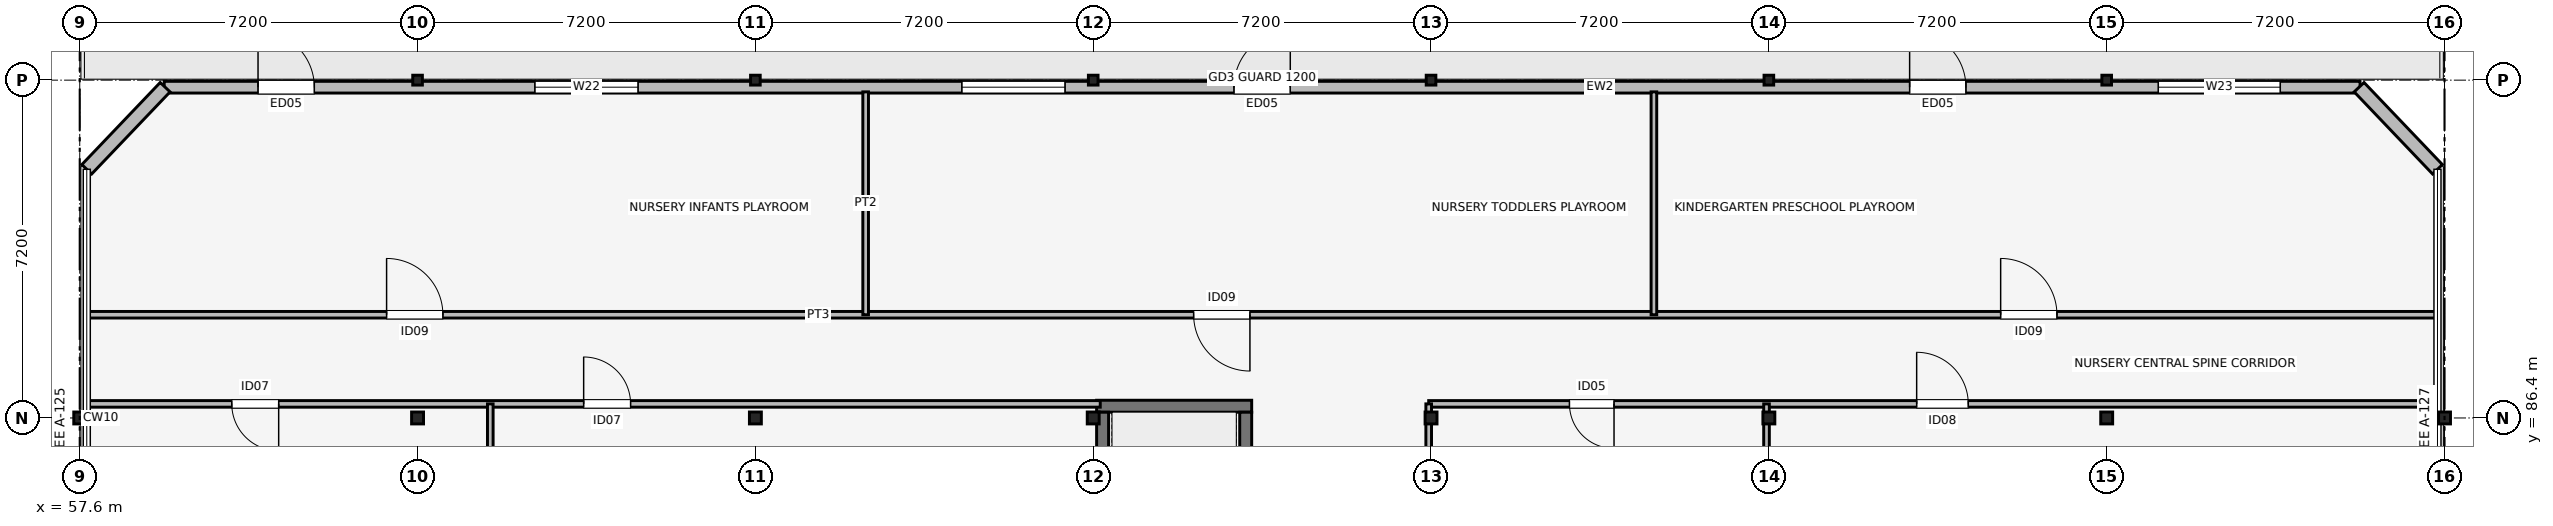
"""IFC4 building model, lengths in metres.
Left out: names, types, materials, properties, quantities, classifications, styles, units other than length and angle.
Written with IfcOpenShell. Run it as: python <this file> out.ifc"""

import sys

from ifc_helpers import new_model, si_unit, direction, frame, frame_2d, origin, origin_2d, place, context, subcontext, project, spatial, rectangle, i_section, extrude, element, fill, save


model = new_model("IFC4")
c1 = context("Model", 3, precision=1e-05, world=origin(), true_north=direction((0.0, 1.0)))
c2 = subcontext(c1, "Body", "Model", "MODEL_VIEW")
j1 = project(units=[si_unit("LENGTHUNIT", "METRE"), si_unit("PLANEANGLEUNIT", "RADIAN")], contexts=[c1])
p1 = place(None, origin())
s1 = spatial("IfcSite", under=j1, at=p1, CompositionType="ELEMENT")
p2 = place(p1, origin())
s2 = spatial("IfcBuilding", under=s1, at=p2, CompositionType="ELEMENT")
p3 = place(p2, frame((0.0, 0.0, 4.5)))
s3 = spatial("IfcBuildingStorey", under=s2, at=p3, CompositionType="ELEMENT", Elevation=4.5)
for number, where, z_axis, x_axis in (
    (1, (57.6, 86.4, 0.0), (0.0, 0.0, 1.0), (1.0, 0.0, 0.0)),
    (2, (64.8, 86.4, 0.0), (0.0, 0.0, 1.0), (1.0, 0.0, 0.0)),
):
    element("IfcColumn", number, at=place(p3, frame(where, z_axis=z_axis, x_axis=x_axis)), inside=s3, PredefinedType="COLUMN", context=c2, shape_type="SweptSolid", body=[
        extrude(i_section(OverallWidth=0.254, OverallDepth=0.254, WebThickness=0.009, FlangeThickness=0.014, FilletRadius=0.013, at=origin_2d()), origin(), (0.0, 0.0, 1.0), 4.2),
    ])
p4 = place(p3, frame((64.8, 93.6, 0.0), z_axis=(0.0, 0.0, 1.0), x_axis=(1.0, 0.0, 0.0)))
e3 = element("IfcColumn", 3, at=p4, inside=s3, PredefinedType="COLUMN", context=c2, shape_type="SweptSolid", body=[
    extrude(i_section(OverallWidth=0.205, OverallDepth=0.21, WebThickness=0.009, FlangeThickness=0.014, FilletRadius=0.01, at=origin_2d()), origin(), (0.0, 0.0, 1.0), 4.2),
])
p5 = place(p3, frame((72.0, 86.4, 0.0), z_axis=(0.0, 0.0, 1.0), x_axis=(1.0, 0.0, 0.0)))
e4 = element("IfcColumn", 4, at=p5, inside=s3, PredefinedType="COLUMN", context=c2, shape_type="SweptSolid", body=[
    extrude(i_section(OverallWidth=0.254, OverallDepth=0.254, WebThickness=0.009, FlangeThickness=0.014, FilletRadius=0.013, at=origin_2d()), origin(), (0.0, 0.0, 1.0), 4.2),
])
p6 = place(p3, frame((72.0, 93.6, 0.0), z_axis=(0.0, 0.0, 1.0), x_axis=(1.0, 0.0, 0.0)))
e5 = element("IfcColumn", 5, at=p6, inside=s3, PredefinedType="COLUMN", context=c2, shape_type="SweptSolid", body=[
    extrude(i_section(OverallWidth=0.205, OverallDepth=0.21, WebThickness=0.009, FlangeThickness=0.014, FilletRadius=0.01, at=origin_2d()), origin(), (0.0, 0.0, 1.0), 4.2),
])
p7 = place(p3, frame((79.2, 86.4, 0.0), z_axis=(0.0, 0.0, 1.0), x_axis=(1.0, 0.0, 0.0)))
e6 = element("IfcColumn", 6, at=p7, inside=s3, PredefinedType="COLUMN", context=c2, shape_type="SweptSolid", body=[
    extrude(i_section(OverallWidth=0.254, OverallDepth=0.254, WebThickness=0.009, FlangeThickness=0.014, FilletRadius=0.013, at=origin_2d()), origin(), (0.0, 0.0, 1.0), 4.2),
])
p8 = place(p3, frame((79.2, 93.6, 0.0), z_axis=(0.0, 0.0, 1.0), x_axis=(1.0, 0.0, 0.0)))
e7 = element("IfcColumn", 7, at=p8, inside=s3, PredefinedType="COLUMN", context=c2, shape_type="SweptSolid", body=[
    extrude(i_section(OverallWidth=0.205, OverallDepth=0.21, WebThickness=0.009, FlangeThickness=0.014, FilletRadius=0.01, at=origin_2d()), origin(), (0.0, 0.0, 1.0), 4.2),
])
p9 = place(p3, frame((86.4, 86.4, 0.0), z_axis=(0.0, 0.0, 1.0), x_axis=(1.0, 0.0, 0.0)))
e8 = element("IfcColumn", 8, at=p9, inside=s3, PredefinedType="COLUMN", context=c2, shape_type="SweptSolid", body=[
    extrude(i_section(OverallWidth=0.254, OverallDepth=0.254, WebThickness=0.009, FlangeThickness=0.014, FilletRadius=0.013, at=origin_2d()), origin(), (0.0, 0.0, 1.0), 4.2),
])
p10 = place(p3, frame((86.4, 93.6, 0.0), z_axis=(0.0, 0.0, 1.0), x_axis=(1.0, 0.0, 0.0)))
e9 = element("IfcColumn", 9, at=p10, inside=s3, PredefinedType="COLUMN", context=c2, shape_type="SweptSolid", body=[
    extrude(i_section(OverallWidth=0.205, OverallDepth=0.21, WebThickness=0.009, FlangeThickness=0.014, FilletRadius=0.01, at=origin_2d()), origin(), (0.0, 0.0, 1.0), 4.2),
])
p11 = place(p3, frame((93.6, 86.4, 0.0), z_axis=(0.0, 0.0, 1.0), x_axis=(1.0, 0.0, 0.0)))
e10 = element("IfcColumn", 10, at=p11, inside=s3, PredefinedType="COLUMN", context=c2, shape_type="SweptSolid", body=[
    extrude(i_section(OverallWidth=0.254, OverallDepth=0.254, WebThickness=0.009, FlangeThickness=0.014, FilletRadius=0.013, at=origin_2d()), origin(), (0.0, 0.0, 1.0), 4.2),
])
p12 = place(p3, frame((93.6, 93.6, 0.0), z_axis=(0.0, 0.0, 1.0), x_axis=(1.0, 0.0, 0.0)))
e11 = element("IfcColumn", 11, at=p12, inside=s3, PredefinedType="COLUMN", context=c2, shape_type="SweptSolid", body=[
    extrude(i_section(OverallWidth=0.205, OverallDepth=0.21, WebThickness=0.009, FlangeThickness=0.014, FilletRadius=0.01, at=origin_2d()), origin(), (0.0, 0.0, 1.0), 4.2),
])
p13 = place(p3, frame((100.8, 86.4, 0.0), z_axis=(0.0, 0.0, 1.0), x_axis=(1.0, 0.0, 0.0)))
e12 = element("IfcColumn", 12, at=p13, inside=s3, PredefinedType="COLUMN", context=c2, shape_type="SweptSolid", body=[
    extrude(i_section(OverallWidth=0.254, OverallDepth=0.254, WebThickness=0.009, FlangeThickness=0.014, FilletRadius=0.013, at=origin_2d()), origin(), (0.0, 0.0, 1.0), 4.2),
])
p14 = place(p3, frame((100.8, 93.6, 0.0), z_axis=(0.0, 0.0, 1.0), x_axis=(1.0, 0.0, 0.0)))
e13 = element("IfcColumn", 13, at=p14, inside=s3, PredefinedType="COLUMN", context=c2, shape_type="SweptSolid", body=[
    extrude(i_section(OverallWidth=0.205, OverallDepth=0.21, WebThickness=0.009, FlangeThickness=0.014, FilletRadius=0.01, at=origin_2d()), origin(), (0.0, 0.0, 1.0), 4.2),
])
p15 = place(p3, frame((108.0, 86.4, 0.0), z_axis=(0.0, 0.0, 1.0), x_axis=(1.0, 0.0, 0.0)))
e14 = element("IfcColumn", 14, at=p15, inside=s3, PredefinedType="COLUMN", context=c2, shape_type="SweptSolid", body=[
    extrude(i_section(OverallWidth=0.254, OverallDepth=0.254, WebThickness=0.009, FlangeThickness=0.014, FilletRadius=0.013, at=origin_2d()), origin(), (0.0, 0.0, 1.0), 4.2),
])
p16 = place(p3, frame((79.272, 86.65, 0.0), z_axis=(0.0, 0.0, 1.0), x_axis=(1.0, 0.0, 0.0)))
e15 = element("IfcWall", 15, at=p16, inside=s3, PredefinedType="SHEAR", context=c2, shape_type="SweptSolid", body=[
    extrude(rectangle(XDim=3.305, YDim=0.255, at=frame_2d((1.652, 0.0))), origin(), (0.0, 0.0, 1.0), 4.2),
])
p17 = place(p3, frame((79.4, 80.228, 0.0), z_axis=(0.0, 0.0, 1.0), x_axis=(0.0, 1.0, 0.0)))
e16 = element("IfcWall", 16, at=p17, inside=s3, PredefinedType="SHEAR", context=c2, shape_type="SweptSolid", body=[
    extrude(rectangle(XDim=6.295, YDim=0.255, at=frame_2d((3.147, 0.0))), origin(), (0.0, 0.0, 1.0), 4.2),
])
p18 = place(p3, frame((82.45, 80.228, 0.0), z_axis=(0.0, 0.0, 1.0), x_axis=(0.0, 1.0, 0.0)))
e17 = element("IfcWall", 17, at=p18, inside=s3, PredefinedType="SHEAR", context=c2, shape_type="SweptSolid", body=[
    extrude(rectangle(XDim=6.295, YDim=0.255, at=frame_2d((3.147, 0.0))), origin(), (0.0, 0.0, 1.0), 4.2),
])
p19 = place(p18, frame((1.3, 0.0, 0.0), z_axis=(0.0, 0.0, 1.0), x_axis=(-1.0, 0.0, 0.0)))
e18 = element("IfcOpeningElement", 18, at=p19, cuts=e17, PredefinedType="OPENING", context=c2, shape_type="SweptSolid", body=[
    extrude(rectangle(XDim=1.05, YDim=2.12, at=frame_2d((0.525, 1.06))), frame((0.0, 0.137, 0.0), z_axis=(0.0, -1.0, 0.0), x_axis=(1.0, 0.0, 0.0)), (0.0, 0.0, 1.0), 0.275),
])
p20 = place(p3, frame((59.4, 93.45, 0.0), z_axis=(0.0, 0.0, 1.0), x_axis=(1.0, 0.0, 0.0)))
e19 = element("IfcWall", 19, at=p20, inside=s3, PredefinedType="SOLIDWALL", context=c2, shape_type="SweptSolid", body=[
    extrude(rectangle(XDim=46.8, YDim=0.25, at=frame_2d((23.4, 0.0))), origin(), (0.0, 0.0, 1.0), 3.448),
])
p21 = place(p20, frame((2.0, 0.0, 0.0)))
e20 = element("IfcOpeningElement", 20, at=p21, cuts=e19, PredefinedType="OPENING", context=c2, shape_type="SweptSolid", body=[
    extrude(rectangle(XDim=1.2, YDim=2.2, at=frame_2d((0.6, 1.1))), frame((0.0, 0.135, 0.0), z_axis=(0.0, -1.0, 0.0), x_axis=(1.0, 0.0, 0.0)), (0.0, 0.0, 1.0), 0.27),
])
p22 = place(p20, frame((7.9, 0.0, 0.65)))
e21 = element("IfcOpeningElement", 21, at=p22, cuts=e19, PredefinedType="OPENING", context=c2, shape_type="SweptSolid", body=[
    extrude(rectangle(XDim=2.2, YDim=2.05, at=frame_2d((1.1, 1.025))), frame((0.0, 0.135, 0.0), z_axis=(0.0, -1.0, 0.0), x_axis=(1.0, 0.0, 0.0)), (0.0, 0.0, 1.0), 0.27),
])
p23 = place(p20, frame((22.8, 0.0, 0.0)))
e22 = element("IfcOpeningElement", 22, at=p23, cuts=e19, PredefinedType="OPENING", context=c2, shape_type="SweptSolid", body=[
    extrude(rectangle(XDim=1.2, YDim=2.2, at=frame_2d((0.6, 1.1))), frame((0.0, 0.135, 0.0), z_axis=(0.0, -1.0, 0.0), x_axis=(1.0, 0.0, 0.0)), (0.0, 0.0, 1.0), 0.27),
])
p24 = place(p20, frame((17.0, 0.0, 0.65)))
e23 = element("IfcOpeningElement", 23, at=p24, cuts=e19, PredefinedType="OPENING", context=c2, shape_type="SweptSolid", body=[
    extrude(rectangle(XDim=2.2, YDim=2.05, at=frame_2d((1.1, 1.025))), frame((0.0, 0.135, 0.0), z_axis=(0.0, -1.0, 0.0), x_axis=(1.0, 0.0, 0.0)), (0.0, 0.0, 1.0), 0.27),
])
p25 = place(p20, frame((37.2, 0.0, 0.0)))
e24 = element("IfcOpeningElement", 24, at=p25, cuts=e19, PredefinedType="OPENING", context=c2, shape_type="SweptSolid", body=[
    extrude(rectangle(XDim=1.2, YDim=2.2, at=frame_2d((0.6, 1.1))), frame((0.0, 0.135, 0.0), z_axis=(0.0, -1.0, 0.0), x_axis=(1.0, 0.0, 0.0)), (0.0, 0.0, 1.0), 0.27),
])
p26 = place(p20, frame((42.5, 0.0, 0.65)))
e25 = element("IfcOpeningElement", 25, at=p26, cuts=e19, PredefinedType="OPENING", context=c2, shape_type="SweptSolid", body=[
    extrude(rectangle(XDim=2.6, YDim=2.05, at=frame_2d((1.3, 1.025))), frame((0.0, 0.135, 0.0), z_axis=(0.0, -1.0, 0.0), x_axis=(1.0, 0.0, 0.0)), (0.0, 0.0, 1.0), 0.27),
])
p27 = place(p3, frame((57.75, 91.7, 0.0), z_axis=(0.0, 0.0, 1.0), x_axis=(0.690360514167, 0.723465521279, 0.0)))
e26 = element("IfcWall", 26, at=p27, inside=s3, PredefinedType="SOLIDWALL", context=c2, shape_type="SweptSolid", body=[
    extrude(rectangle(XDim=2.419, YDim=0.29, at=frame_2d((1.209, 0.0))), origin(), (0.0, 0.0, 1.0), 3.55),
])
p28 = place(p3, frame((107.85, 91.7, 0.0), z_axis=(0.0, 0.0, 1.0), x_axis=(-0.690413335594, 0.72341511322, 0.0)))
e27 = element("IfcWall", 27, at=p28, inside=s3, PredefinedType="SOLIDWALL", context=c2, shape_type="SweptSolid", body=[
    extrude(rectangle(XDim=2.419, YDim=0.29, at=frame_2d((1.209, 0.0))), origin(), (0.0, 0.0, 1.0), 3.55),
])
p29 = place(p3, frame((57.74, 88.6, 0.0), z_axis=(0.0, 0.0, 1.0), x_axis=(1.0, 0.0, 0.0)))
e28 = element("IfcWall", 28, at=p29, inside=s3, PredefinedType="PARTITIONING", context=c2, shape_type="SweptSolid", body=[
    extrude(rectangle(XDim=50.12, YDim=0.14, at=frame_2d((25.06, 0.0))), origin(), (0.0, 0.0, 1.0), 3.2),
])
p30 = place(p29, frame((6.4, 0.0, 0.0)))
e29 = element("IfcOpeningElement", 29, at=p30, cuts=e28, PredefinedType="OPENING", context=c2, shape_type="SweptSolid", body=[
    extrude(rectangle(XDim=1.2, YDim=2.18, at=frame_2d((0.6, 1.09))), frame((0.0, 0.08, 0.0), z_axis=(0.0, -1.0, 0.0), x_axis=(1.0, 0.0, 0.0)), (0.0, 0.0, 1.0), 0.16),
])
p31 = place(p29, frame((24.8, 0.0, 0.0), z_axis=(0.0, 0.0, 1.0), x_axis=(-1.0, 0.0, 0.0)))
e30 = element("IfcOpeningElement", 30, at=p31, cuts=e28, PredefinedType="OPENING", context=c2, shape_type="SweptSolid", body=[
    extrude(rectangle(XDim=1.2, YDim=2.18, at=frame_2d((0.6, 1.09))), frame((0.0, 0.08, 0.0), z_axis=(0.0, -1.0, 0.0), x_axis=(1.0, 0.0, 0.0)), (0.0, 0.0, 1.0), 0.16),
])
p32 = place(p29, frame((40.8, 0.0, 0.0)))
e31 = element("IfcOpeningElement", 31, at=p32, cuts=e28, PredefinedType="OPENING", context=c2, shape_type="SweptSolid", body=[
    extrude(rectangle(XDim=1.2, YDim=2.18, at=frame_2d((0.6, 1.09))), frame((0.0, 0.08, 0.0), z_axis=(0.0, -1.0, 0.0), x_axis=(1.0, 0.0, 0.0)), (0.0, 0.0, 1.0), 0.16),
])
for number, where, z_axis, x_axis in (
    (32, (74.35, 88.6, 0.0), (0.0, 0.0, 1.0), (0.0, 1.0, 0.0)),
    (33, (91.15, 88.6, 0.0), (0.0, 0.0, 1.0), (0.0, 1.0, 0.0)),
):
    element("IfcWall", number, at=place(p3, frame(where, z_axis=z_axis, x_axis=x_axis)), inside=s3, PredefinedType="PARTITIONING", context=c2, shape_type="SweptSolid", body=[
        extrude(rectangle(XDim=4.75, YDim=0.12, at=frame_2d((2.375, 0.0))), origin(), (0.0, 0.0, 1.0), 3.2),
    ])
p33 = place(p3, frame((57.74, 86.7, 0.0), z_axis=(0.0, 0.0, 1.0), x_axis=(1.0, 0.0, 0.0)))
e34 = element("IfcWall", 34, at=p33, inside=s3, PredefinedType="PARTITIONING", context=c2, shape_type="SweptSolid", body=[
    extrude(rectangle(XDim=21.61, YDim=0.14, at=frame_2d((10.805, 0.0))), origin(), (0.0, 0.0, 1.0), 3.2),
])
p34 = place(p33, frame((4.1, 0.0, 0.0), z_axis=(0.0, 0.0, 1.0), x_axis=(-1.0, 0.0, 0.0)))
e35 = element("IfcOpeningElement", 35, at=p34, cuts=e34, PredefinedType="OPENING", context=c2, shape_type="SweptSolid", body=[
    extrude(rectangle(XDim=1.0, YDim=2.12, at=frame_2d((0.5, 1.06))), frame((0.0, 0.08, 0.0), z_axis=(0.0, -1.0, 0.0), x_axis=(1.0, 0.0, 0.0)), (0.0, 0.0, 1.0), 0.16),
])
p35 = place(p33, frame((10.6, 0.0, 0.0)))
e36 = element("IfcOpeningElement", 36, at=p35, cuts=e34, PredefinedType="OPENING", context=c2, shape_type="SweptSolid", body=[
    extrude(rectangle(XDim=1.0, YDim=2.12, at=frame_2d((0.5, 1.06))), frame((0.0, 0.08, 0.0), z_axis=(0.0, -1.0, 0.0), x_axis=(1.0, 0.0, 0.0)), (0.0, 0.0, 1.0), 0.16),
])
p36 = place(p3, frame((86.35, 86.7, 0.0), z_axis=(0.0, 0.0, 1.0), x_axis=(1.0, 0.0, 0.0)))
e37 = element("IfcWall", 37, at=p36, inside=s3, PredefinedType="PARTITIONING", context=c2, shape_type="SweptSolid", body=[
    extrude(rectangle(XDim=21.51, YDim=0.14, at=frame_2d((10.755, 0.0))), origin(), (0.0, 0.0, 1.0), 3.2),
])
p37 = place(p36, frame((3.95, 0.0, 0.0), z_axis=(0.0, 0.0, 1.0), x_axis=(-1.0, 0.0, 0.0)))
e38 = element("IfcOpeningElement", 38, at=p37, cuts=e37, PredefinedType="OPENING", context=c2, shape_type="SweptSolid", body=[
    extrude(rectangle(XDim=0.95, YDim=2.12, at=frame_2d((0.475, 1.06))), frame((0.0, 0.08, 0.0), z_axis=(0.0, -1.0, 0.0), x_axis=(1.0, 0.0, 0.0)), (0.0, 0.0, 1.0), 0.16),
])
p38 = place(p36, frame((10.4, 0.0, 0.0)))
e39 = element("IfcOpeningElement", 39, at=p38, cuts=e37, PredefinedType="OPENING", context=c2, shape_type="SweptSolid", body=[
    extrude(rectangle(XDim=1.1, YDim=2.15, at=frame_2d((0.55, 1.075))), frame((0.0, 0.08, 0.0), z_axis=(0.0, -1.0, 0.0), x_axis=(1.0, 0.0, 0.0)), (0.0, 0.0, 1.0), 0.16),
])
for number, where, z_axis, x_axis in (
    (40, (66.35, 79.5, 0.0), (0.0, 0.0, 1.0), (0.0, 1.0, 0.0)),
    (41, (86.35, 79.5, 0.0), (0.0, 0.0, 1.0), (0.0, 1.0, 0.0)),
    (42, (93.55, 79.5, 0.0), (0.0, 0.0, 1.0), (0.0, 1.0, 0.0)),
):
    element("IfcWall", number, at=place(p3, frame(where, z_axis=z_axis, x_axis=x_axis)), inside=s3, PredefinedType="PARTITIONING", context=c2, shape_type="SweptSolid", body=[
        extrude(rectangle(XDim=7.2, YDim=0.12, at=frame_2d((3.6, 0.0))), origin(), (0.0, 0.0, 1.0), 3.2),
    ])
p39 = place(p21, origin())
e43 = element("IfcDoor", 43, at=p39, inside=s3, OperationType="SINGLE_SWING_LEFT", PredefinedType="DOOR", context=c2, shape_type="SweptSolid", body=[
    extrude(rectangle(XDim=1.2, YDim=2.2, at=frame_2d((0.6, 1.1))), frame((0.0, 0.025, 0.0), z_axis=(0.0, -1.0, 0.0), x_axis=(1.0, 0.0, 0.0)), (0.0, 0.0, 1.0), 0.05),
])
fill(e20, e43)
p40 = place(p22, origin())
e44 = element("IfcWindow", 44, at=p40, inside=s3, PartitioningType="SINGLE_PANEL", PredefinedType="WINDOW", context=c2, shape_type="SweptSolid", body=[
    extrude(rectangle(XDim=2.2, YDim=2.05, at=frame_2d((1.1, 1.025))), frame((0.0, 0.03, 0.0), z_axis=(0.0, -1.0, 0.0), x_axis=(1.0, 0.0, 0.0)), (0.0, 0.0, 1.0), 0.06),
])
fill(e21, e44)
p41 = place(p23, origin())
e45 = element("IfcDoor", 45, at=p41, inside=s3, OperationType="SINGLE_SWING_RIGHT", PredefinedType="DOOR", context=c2, shape_type="SweptSolid", body=[
    extrude(rectangle(XDim=1.2, YDim=2.2, at=frame_2d((0.6, 1.1))), frame((0.0, 0.025, 0.0), z_axis=(0.0, -1.0, 0.0), x_axis=(1.0, 0.0, 0.0)), (0.0, 0.0, 1.0), 0.05),
])
fill(e22, e45)
p42 = place(p24, origin())
e46 = element("IfcWindow", 46, at=p42, inside=s3, PartitioningType="SINGLE_PANEL", PredefinedType="WINDOW", context=c2, shape_type="SweptSolid", body=[
    extrude(rectangle(XDim=2.2, YDim=2.05, at=frame_2d((1.1, 1.025))), frame((0.0, 0.03, 0.0), z_axis=(0.0, -1.0, 0.0), x_axis=(1.0, 0.0, 0.0)), (0.0, 0.0, 1.0), 0.06),
])
fill(e23, e46)
p43 = place(p25, origin())
e47 = element("IfcDoor", 47, at=p43, inside=s3, OperationType="SINGLE_SWING_LEFT", PredefinedType="DOOR", context=c2, shape_type="SweptSolid", body=[
    extrude(rectangle(XDim=1.2, YDim=2.2, at=frame_2d((0.6, 1.1))), frame((0.0, 0.025, 0.0), z_axis=(0.0, -1.0, 0.0), x_axis=(1.0, 0.0, 0.0)), (0.0, 0.0, 1.0), 0.05),
])
fill(e24, e47)
p44 = place(p26, origin())
e48 = element("IfcWindow", 48, at=p44, inside=s3, PartitioningType="SINGLE_PANEL", PredefinedType="WINDOW", context=c2, shape_type="SweptSolid", body=[
    extrude(rectangle(XDim=2.6, YDim=2.05, at=frame_2d((1.3, 1.025))), frame((0.0, 0.03, 0.0), z_axis=(0.0, -1.0, 0.0), x_axis=(1.0, 0.0, 0.0)), (0.0, 0.0, 1.0), 0.06),
])
fill(e25, e48)
p45 = place(p30, origin())
e49 = element("IfcDoor", 49, at=p45, inside=s3, OperationType="SINGLE_SWING_LEFT", PredefinedType="DOOR", context=c2, shape_type="SweptSolid", body=[
    extrude(rectangle(XDim=1.2, YDim=2.18, at=frame_2d((0.6, 1.09))), frame((0.0, 0.025, 0.0), z_axis=(0.0, -1.0, 0.0), x_axis=(1.0, 0.0, 0.0)), (0.0, 0.0, 1.0), 0.05),
])
fill(e29, e49)
p46 = place(p31, origin())
e50 = element("IfcDoor", 50, at=p46, inside=s3, OperationType="SINGLE_SWING_RIGHT", PredefinedType="DOOR", context=c2, shape_type="SweptSolid", body=[
    extrude(rectangle(XDim=1.2, YDim=2.18, at=frame_2d((0.6, 1.09))), frame((0.0, 0.025, 0.0), z_axis=(0.0, -1.0, 0.0), x_axis=(1.0, 0.0, 0.0)), (0.0, 0.0, 1.0), 0.05),
])
fill(e30, e50)
p47 = place(p32, origin())
e51 = element("IfcDoor", 51, at=p47, inside=s3, OperationType="SINGLE_SWING_LEFT", PredefinedType="DOOR", context=c2, shape_type="SweptSolid", body=[
    extrude(rectangle(XDim=1.2, YDim=2.18, at=frame_2d((0.6, 1.09))), frame((0.0, 0.025, 0.0), z_axis=(0.0, -1.0, 0.0), x_axis=(1.0, 0.0, 0.0)), (0.0, 0.0, 1.0), 0.05),
])
fill(e31, e51)
p48 = place(p34, origin())
e52 = element("IfcDoor", 52, at=p48, inside=s3, OperationType="SINGLE_SWING_RIGHT", PredefinedType="DOOR", context=c2, shape_type="SweptSolid", body=[
    extrude(rectangle(XDim=1.0, YDim=2.12, at=frame_2d((0.5, 1.06))), frame((0.0, 0.025, 0.0), z_axis=(0.0, -1.0, 0.0), x_axis=(1.0, 0.0, 0.0)), (0.0, 0.0, 1.0), 0.05),
])
fill(e35, e52)
p49 = place(p35, origin())
e53 = element("IfcDoor", 53, at=p49, inside=s3, OperationType="SINGLE_SWING_LEFT", PredefinedType="DOOR", context=c2, shape_type="SweptSolid", body=[
    extrude(rectangle(XDim=1.0, YDim=2.12, at=frame_2d((0.5, 1.06))), frame((0.0, 0.025, 0.0), z_axis=(0.0, -1.0, 0.0), x_axis=(1.0, 0.0, 0.0)), (0.0, 0.0, 1.0), 0.05),
])
fill(e36, e53)
p50 = place(p37, origin())
e54 = element("IfcDoor", 54, at=p50, inside=s3, OperationType="SINGLE_SWING_RIGHT", PredefinedType="DOOR", context=c2, shape_type="SweptSolid", body=[
    extrude(rectangle(XDim=0.95, YDim=2.12, at=frame_2d((0.475, 1.06))), frame((0.0, 0.025, 0.0), z_axis=(0.0, -1.0, 0.0), x_axis=(1.0, 0.0, 0.0)), (0.0, 0.0, 1.0), 0.05),
])
fill(e38, e54)
p51 = place(p38, origin())
e55 = element("IfcDoor", 55, at=p51, inside=s3, OperationType="SINGLE_SWING_LEFT", PredefinedType="DOOR", context=c2, shape_type="SweptSolid", body=[
    extrude(rectangle(XDim=1.1, YDim=2.15, at=frame_2d((0.55, 1.075))), frame((0.0, 0.025, 0.0), z_axis=(0.0, -1.0, 0.0), x_axis=(1.0, 0.0, 0.0)), (0.0, 0.0, 1.0), 0.05),
])
fill(e39, e55)
save(model, sys.argv[1])
